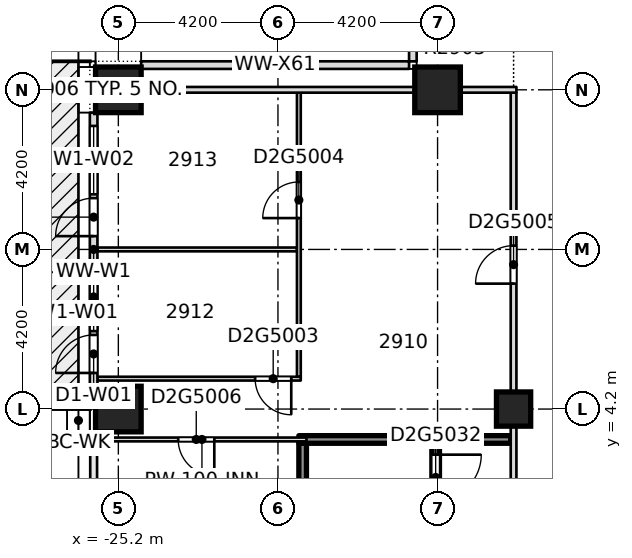
"""IFC4 building model, lengths in metres.
Left out: names, types, materials, properties, quantities, classifications, styles, units other than length and angle.
Written with IfcOpenShell. Run it as: python <this file> out.ifc"""

import sys

from ifc_helpers import new_model, si_unit, direction, frame, frame_2d, origin, origin_2d, place, context, subcontext, project, spatial, rectangle, extrude, element, fill, save


model = new_model("IFC4")
c1 = context("Model", 3, precision=1e-05, world=origin(), true_north=direction((0.0, 1.0)))
c2 = subcontext(c1, "Body", "Model", "MODEL_VIEW")
j1 = project(units=[si_unit("LENGTHUNIT", "METRE"), si_unit("PLANEANGLEUNIT", "RADIAN")], contexts=[c1])
p1 = place(None, origin())
s1 = spatial("IfcSite", under=j1, at=p1, CompositionType="ELEMENT")
p2 = place(p1, origin())
s2 = spatial("IfcBuilding", under=s1, at=p2, CompositionType="ELEMENT")
p3 = place(p2, frame((0.0, 0.0, 114.9)))
s3 = spatial("IfcBuildingStorey", under=s2, at=p3, CompositionType="ELEMENT", Elevation=114.9)
for number, where, z_axis, x_axis in (
    (1, (-25.2, 4.2, -0.32), (0.0, 0.0, 1.0), (1.0, 0.0, 0.0)),
    (2, (-25.2, 12.6, -0.32), (0.0, 0.0, 1.0), (1.0, 0.0, 0.0)),
    (3, (-16.8, 12.6, -0.32), (0.0, 0.0, 1.0), (1.0, 0.0, 0.0)),
):
    element("IfcColumn", number, at=place(p3, frame(where, z_axis=z_axis, x_axis=x_axis)), inside=s3, PredefinedType="COLUMN", context=c2, shape_type="SweptSolid", body=[
        extrude(rectangle(XDim=1.2, YDim=1.2, at=origin_2d()), origin(), (0.0, 0.0, 1.0), 3.45),
    ])
p4 = place(p3, frame((-14.8, 4.2, -0.32), z_axis=(0.0, 0.0, 1.0), x_axis=(1.0, 0.0, 0.0)))
e4 = element("IfcColumn", 4, at=p4, inside=s3, PredefinedType="COLUMN", context=c2, shape_type="SweptSolid", body=[
    extrude(rectangle(XDim=0.9, YDim=0.9, at=origin_2d()), origin(), (0.0, 0.0, 1.0), 3.45),
])
p5 = place(p3, frame((-25.75, 3.4, 0.0), z_axis=(0.0, 0.0, 1.0), x_axis=(1.0, 0.0, 0.0)))
e5 = element("IfcWall", 5, at=p5, inside=s3, PredefinedType="PARTITIONING", context=c2, shape_type="SweptSolid", body=[
    extrude(rectangle(XDim=5.5, YDim=0.1, at=frame_2d((2.75, 0.0))), origin(), (0.0, 0.0, 1.0), 3.13),
])
p6 = place(p5, frame((2.125, 0.0, 0.0)))
e6 = element("IfcOpeningElement", 6, at=p6, cuts=e5, PredefinedType="OPENING", context=c2, shape_type="SweptSolid", body=[
    extrude(rectangle(XDim=0.95, YDim=2.1, at=frame_2d((0.475, 1.05))), frame((0.0, 0.06, 0.0), z_axis=(0.0, -1.0, 0.0), x_axis=(1.0, 0.0, 0.0)), (0.0, 0.0, 1.0), 0.12),
])
p7 = place(p3, frame((-20.45, 3.4, 0.0), z_axis=(0.0, 0.0, 1.0), x_axis=(1.0, 0.0, 0.0)))
e7 = element("IfcWall", 7, at=p7, inside=s3, PredefinedType="SOLIDWALL", context=c2, shape_type="SweptSolid", body=[
    extrude(rectangle(XDim=5.575, YDim=0.2, at=frame_2d((2.788, 0.0))), origin(), (0.0, 0.0, 1.0), 3.13),
])
p8 = place(p3, frame((-25.75, 5.0, 0.0), z_axis=(0.0, 0.0, 1.0), x_axis=(1.0, 0.0, 0.0)))
e8 = element("IfcWall", 8, at=p8, inside=s3, PredefinedType="PARTITIONING", context=c2, shape_type="SweptSolid", body=[
    extrude(rectangle(XDim=5.35, YDim=0.1, at=frame_2d((2.675, 0.0))), origin(), (0.0, 0.0, 1.0), 3.13),
])
p9 = place(p8, frame((4.15, 0.0, 0.0)))
e9 = element("IfcOpeningElement", 9, at=p9, cuts=e8, PredefinedType="OPENING", context=c2, shape_type="SweptSolid", body=[
    extrude(rectangle(XDim=0.95, YDim=2.1, at=frame_2d((0.475, 1.05))), frame((0.0, 0.06, 0.0), z_axis=(0.0, -1.0, 0.0), x_axis=(1.0, 0.0, 0.0)), (0.0, 0.0, 1.0), 0.12),
])
p10 = place(p3, frame((-25.75, 8.4, 0.0), z_axis=(0.0, 0.0, 1.0), x_axis=(1.0, 0.0, 0.0)))
e10 = element("IfcWall", 10, at=p10, inside=s3, PredefinedType="PARTITIONING", context=c2, shape_type="SweptSolid", body=[
    extrude(rectangle(XDim=5.25, YDim=0.1, at=frame_2d((2.625, 0.0))), origin(), (0.0, 0.0, 1.0), 3.13),
])
p11 = place(p3, frame((-25.75, 12.6, 0.0), z_axis=(0.0, 0.0, 1.0), x_axis=(1.0, 0.0, 0.0)))
e11 = element("IfcWall", 11, at=p11, inside=s3, PredefinedType="PARTITIONING", context=c2, shape_type="SweptSolid", body=[
    extrude(rectangle(XDim=1.15, YDim=0.15, at=frame_2d((0.575, 0.0))), origin(), (0.0, 0.0, 1.0), 3.13),
])
p12 = place(p3, frame((-20.45, 5.05, 0.0), z_axis=(0.0, 0.0, 1.0), x_axis=(0.0, 1.0, 0.0)))
e12 = element("IfcWall", 12, at=p12, inside=s3, PredefinedType="PARTITIONING", context=c2, shape_type="SweptSolid", body=[
    extrude(rectangle(XDim=7.475, YDim=0.1, at=frame_2d((3.737, 0.0))), origin(), (0.0, 0.0, 1.0), 3.13),
])
p13 = place(p12, frame((4.175, 0.0, 0.0)))
e13 = element("IfcOpeningElement", 13, at=p13, cuts=e12, PredefinedType="OPENING", context=c2, shape_type="SweptSolid", body=[
    extrude(rectangle(XDim=0.95, YDim=2.1, at=frame_2d((0.475, 1.05))), frame((0.0, 0.06, 0.0), z_axis=(0.0, -1.0, 0.0), x_axis=(1.0, 0.0, 0.0)), (0.0, 0.0, 1.0), 0.12),
])
p14 = place(p3, frame((-20.35, 0.07, 0.0), z_axis=(0.0, 0.0, 1.0), x_axis=(0.0, 1.0, 0.0)))
e14 = element("IfcWall", 14, at=p14, inside=s3, PredefinedType="SOLIDWALL", context=c2, shape_type="SweptSolid", body=[
    extrude(rectangle(XDim=3.23, YDim=0.2, at=frame_2d((1.615, 0.0))), origin(), (0.0, 0.0, 1.0), 3.13),
])
p15 = place(p3, frame((-16.85, -3.3, 0.0), z_axis=(0.0, 0.0, 1.0), x_axis=(0.0, 1.0, 0.0)))
e15 = element("IfcWall", 15, at=p15, inside=s3, PredefinedType="SOLIDWALL", context=c2, shape_type="SweptSolid", body=[
    extrude(rectangle(XDim=6.6, YDim=0.2, at=frame_2d((3.3, 0.0))), origin(), (0.0, 0.0, 1.0), 3.13),
])
p16 = place(p15, frame((5.1, 0.0, 0.0)))
e16 = element("IfcOpeningElement", 16, at=p16, cuts=e15, PredefinedType="OPENING", context=c2, shape_type="SweptSolid", body=[
    extrude(rectangle(XDim=1.2, YDim=2.1, at=frame_2d((0.6, 1.05))), frame((0.0, 0.11, 0.0), z_axis=(0.0, -1.0, 0.0), x_axis=(1.0, 0.0, 0.0)), (0.0, 0.0, 1.0), 0.22),
])
p17 = place(p3, frame((-14.8, -6.225, 0.0), z_axis=(0.0, 0.0, 1.0), x_axis=(0.0, 1.0, 0.0)))
e17 = element("IfcWall", 17, at=p17, inside=s3, PredefinedType="PARTITIONING", context=c2, shape_type="SweptSolid", body=[
    extrude(rectangle(XDim=18.75, YDim=0.15, at=frame_2d((9.375, 0.0))), origin(), (0.0, 0.0, 1.0), 3.13),
])
p18 = place(p17, frame((13.725, 0.0, 0.0)))
e18 = element("IfcOpeningElement", 18, at=p18, cuts=e17, PredefinedType="OPENING", context=c2, shape_type="SweptSolid", body=[
    extrude(rectangle(XDim=1.0, YDim=2.1, at=frame_2d((0.5, 1.05))), frame((0.0, 0.085, 0.0), z_axis=(0.0, -1.0, 0.0), x_axis=(1.0, 0.0, 0.0)), (0.0, 0.0, 1.0), 0.17),
])
p19 = place(p17, frame((5.675, 0.0, 0.0)))
e19 = element("IfcOpeningElement", 19, at=p19, cuts=e17, PredefinedType="OPENING", context=c2, shape_type="SweptSolid", body=[
    extrude(rectangle(XDim=1.1, YDim=2.1, at=frame_2d((0.55, 1.05))), frame((0.0, 0.085, 0.0), z_axis=(0.0, -1.0, 0.0), x_axis=(1.0, 0.0, 0.0)), (0.0, 0.0, 1.0), 0.17),
])
p20 = place(p3, frame((-17.45, 20.4, 0.0), z_axis=(0.0, 0.0, 1.0), x_axis=(0.0, -1.0, 0.0)))
e20 = element("IfcWall", 20, at=p20, inside=s3, PredefinedType="STANDARD", context=c2, shape_type="SweptSolid", body=[
    extrude(rectangle(XDim=7.05, YDim=0.2, at=frame_2d((3.525, 0.0))), origin(), (0.0, 0.0, 1.0), 3.13),
])
p21 = place(p20, frame((3.875, 0.0, 0.2)))
e21 = element("IfcOpeningElement", 21, at=p21, cuts=e20, PredefinedType="OPENING", context=c2, shape_type="SweptSolid", body=[
    extrude(rectangle(XDim=1.8, YDim=2.65, at=frame_2d((0.9, 1.325))), frame((0.0, 0.11, 0.0), z_axis=(0.0, -1.0, 0.0), x_axis=(1.0, 0.0, 0.0)), (0.0, 0.0, 1.0), 0.22),
])
p22 = place(p20, frame((0.35, 0.0, 0.2)))
e22 = element("IfcOpeningElement", 22, at=p22, cuts=e20, PredefinedType="OPENING", context=c2, shape_type="SweptSolid", body=[
    extrude(rectangle(XDim=1.8, YDim=2.65, at=frame_2d((0.9, 1.325))), frame((0.0, 0.11, 0.0), z_axis=(0.0, -1.0, 0.0), x_axis=(1.0, 0.0, 0.0)), (0.0, 0.0, 1.0), 0.22),
])
p23 = place(p3, frame((-17.55, 13.25, 0.0), z_axis=(0.0, 0.0, 1.0), x_axis=(-1.0, 0.0, 0.0)))
e23 = element("IfcWall", 23, at=p23, inside=s3, PredefinedType="STANDARD", context=c2, shape_type="SweptSolid", body=[
    extrude(rectangle(XDim=7.05, YDim=0.2, at=frame_2d((3.525, 0.0))), origin(), (0.0, 0.0, 1.0), 3.13),
])
p24 = place(p3, frame((-25.85, 12.0, 0.0), z_axis=(0.0, 0.0, 1.0), x_axis=(0.0, -1.0, 0.0)))
e24 = element("IfcWall", 24, at=p24, inside=s3, PredefinedType="STANDARD", context=c2, shape_type="SweptSolid", body=[
    extrude(rectangle(XDim=7.2, YDim=0.2, at=frame_2d((3.6, 0.0))), origin(), (0.0, 0.0, 1.0), 3.13),
])
p25 = place(p24, frame((3.95, 0.0, 0.2)))
e25 = element("IfcOpeningElement", 25, at=p25, cuts=e24, PredefinedType="OPENING", context=c2, shape_type="SweptSolid", body=[
    extrude(rectangle(XDim=1.8, YDim=2.65, at=frame_2d((0.9, 1.325))), frame((0.0, 0.11, 0.0), z_axis=(0.0, -1.0, 0.0), x_axis=(1.0, 0.0, 0.0)), (0.0, 0.0, 1.0), 0.22),
])
p26 = place(p24, frame((5.85, 0.0, 0.0)))
e26 = element("IfcOpeningElement", 26, at=p26, cuts=e24, PredefinedType="OPENING", context=c2, shape_type="SweptSolid", body=[
    extrude(rectangle(XDim=1.0, YDim=2.4, at=frame_2d((0.5, 1.2))), frame((0.0, 0.11, 0.0), z_axis=(0.0, -1.0, 0.0), x_axis=(1.0, 0.0, 0.0)), (0.0, 0.0, 1.0), 0.22),
])
p27 = place(p24, frame((0.35, 0.0, 0.2)))
e27 = element("IfcOpeningElement", 27, at=p27, cuts=e24, PredefinedType="OPENING", context=c2, shape_type="SweptSolid", body=[
    extrude(rectangle(XDim=1.8, YDim=2.65, at=frame_2d((0.9, 1.325))), frame((0.0, 0.11, 0.0), z_axis=(0.0, -1.0, 0.0), x_axis=(1.0, 0.0, 0.0)), (0.0, 0.0, 1.0), 0.22),
])
p28 = place(p24, frame((2.25, 0.0, 0.0)))
e28 = element("IfcOpeningElement", 28, at=p28, cuts=e24, PredefinedType="OPENING", context=c2, shape_type="SweptSolid", body=[
    extrude(rectangle(XDim=1.0, YDim=2.4, at=frame_2d((0.5, 1.2))), frame((0.0, 0.11, 0.0), z_axis=(0.0, -1.0, 0.0), x_axis=(1.0, 0.0, 0.0)), (0.0, 0.0, 1.0), 0.22),
])
p29 = place(p3, frame((-24.6, 12.6, 0.0), z_axis=(0.0, 0.0, 1.0), x_axis=(1.0, 0.0, 0.0)))
e29 = element("IfcWall", 29, at=p29, inside=s3, PredefinedType="PARTITIONING", context=c2, shape_type="SweptSolid", body=[
    extrude(rectangle(XDim=7.2, YDim=0.15, at=frame_2d((3.6, 0.0))), origin(), (0.0, 0.0, 1.0), 2.58),
])
p30 = place(p3, frame((-17.4, 12.6, 0.0), z_axis=(0.0, 0.0, 1.0), x_axis=(1.0, 0.0, 0.0)))
e30 = element("IfcWall", 30, at=p30, inside=s3, PredefinedType="PARTITIONING", context=c2, shape_type="SweptSolid", body=[
    extrude(rectangle(XDim=2.675, YDim=0.15, at=frame_2d((1.337, 0.0))), origin(), (0.0, 0.0, 1.0), 3.13),
])
p31 = place(p9, origin())
e31 = element("IfcDoor", 31, at=p31, inside=s3, OperationType="SINGLE_SWING_LEFT", PredefinedType="DOOR", context=c2, shape_type="SweptSolid", body=[
    extrude(rectangle(XDim=0.95, YDim=2.1, at=frame_2d((0.475, 1.05))), frame((0.0, 0.025, 0.0), z_axis=(0.0, -1.0, 0.0), x_axis=(1.0, 0.0, 0.0)), (0.0, 0.0, 1.0), 0.05),
])
fill(e9, e31)
p32 = place(p13, origin())
e32 = element("IfcDoor", 32, at=p32, inside=s3, OperationType="SINGLE_SWING_LEFT", PredefinedType="DOOR", context=c2, shape_type="SweptSolid", body=[
    extrude(rectangle(XDim=0.95, YDim=2.1, at=frame_2d((0.475, 1.05))), frame((0.0, 0.025, 0.0), z_axis=(0.0, -1.0, 0.0), x_axis=(1.0, 0.0, 0.0)), (0.0, 0.0, 1.0), 0.05),
])
fill(e13, e32)
p33 = place(p18, origin())
e33 = element("IfcDoor", 33, at=p33, inside=s3, OperationType="SINGLE_SWING_LEFT", PredefinedType="DOOR", context=c2, shape_type="SweptSolid", body=[
    extrude(rectangle(XDim=1.0, YDim=2.1, at=frame_2d((0.5, 1.05))), frame((0.0, 0.025, 0.0), z_axis=(0.0, -1.0, 0.0), x_axis=(1.0, 0.0, 0.0)), (0.0, 0.0, 1.0), 0.05),
])
fill(e18, e33)
p34 = place(p6, origin())
e34 = element("IfcDoor", 34, at=p34, inside=s3, OperationType="SINGLE_SWING_LEFT", PredefinedType="DOOR", context=c2, shape_type="SweptSolid", body=[
    extrude(rectangle(XDim=0.95, YDim=2.1, at=frame_2d((0.475, 1.05))), frame((0.0, 0.025, 0.0), z_axis=(0.0, -1.0, 0.0), x_axis=(1.0, 0.0, 0.0)), (0.0, 0.0, 1.0), 0.05),
])
fill(e6, e34)
p35 = place(p16, origin())
e35 = element("IfcDoor", 35, at=p35, inside=s3, OperationType="SINGLE_SWING_RIGHT", PredefinedType="DOOR", context=c2, shape_type="SweptSolid", body=[
    extrude(rectangle(XDim=1.2, YDim=2.1, at=frame_2d((0.6, 1.05))), frame((0.0, 0.025, 0.0), z_axis=(0.0, -1.0, 0.0), x_axis=(1.0, 0.0, 0.0)), (0.0, 0.0, 1.0), 0.05),
])
fill(e16, e35)
p36 = place(p25, origin())
e36 = element("IfcWindow", 36, at=p36, inside=s3, PartitioningType="SINGLE_PANEL", PredefinedType="WINDOW", context=c2, shape_type="SweptSolid", body=[
    extrude(rectangle(XDim=1.8, YDim=2.65, at=frame_2d((0.9, 1.325))), frame((0.0, 0.03, 0.0), z_axis=(0.0, -1.0, 0.0), x_axis=(1.0, 0.0, 0.0)), (0.0, 0.0, 1.0), 0.06),
])
fill(e25, e36)
p37 = place(p26, origin())
e37 = element("IfcDoor", 37, at=p37, inside=s3, OperationType="SINGLE_SWING_LEFT", PredefinedType="DOOR", context=c2, shape_type="SweptSolid", body=[
    extrude(rectangle(XDim=1.0, YDim=2.4, at=frame_2d((0.5, 1.2))), frame((0.0, 0.025, 0.0), z_axis=(0.0, -1.0, 0.0), x_axis=(1.0, 0.0, 0.0)), (0.0, 0.0, 1.0), 0.05),
])
fill(e26, e37)
p38 = place(p27, origin())
e38 = element("IfcWindow", 38, at=p38, inside=s3, PartitioningType="SINGLE_PANEL", PredefinedType="WINDOW", context=c2, shape_type="SweptSolid", body=[
    extrude(rectangle(XDim=1.8, YDim=2.65, at=frame_2d((0.9, 1.325))), frame((0.0, 0.03, 0.0), z_axis=(0.0, -1.0, 0.0), x_axis=(1.0, 0.0, 0.0)), (0.0, 0.0, 1.0), 0.06),
])
fill(e27, e38)
p39 = place(p28, origin())
e39 = element("IfcDoor", 39, at=p39, inside=s3, OperationType="SINGLE_SWING_LEFT", PredefinedType="DOOR", context=c2, shape_type="SweptSolid", body=[
    extrude(rectangle(XDim=1.0, YDim=2.4, at=frame_2d((0.5, 1.2))), frame((0.0, 0.025, 0.0), z_axis=(0.0, -1.0, 0.0), x_axis=(1.0, 0.0, 0.0)), (0.0, 0.0, 1.0), 0.05),
])
fill(e28, e39)
save(model, sys.argv[1])
